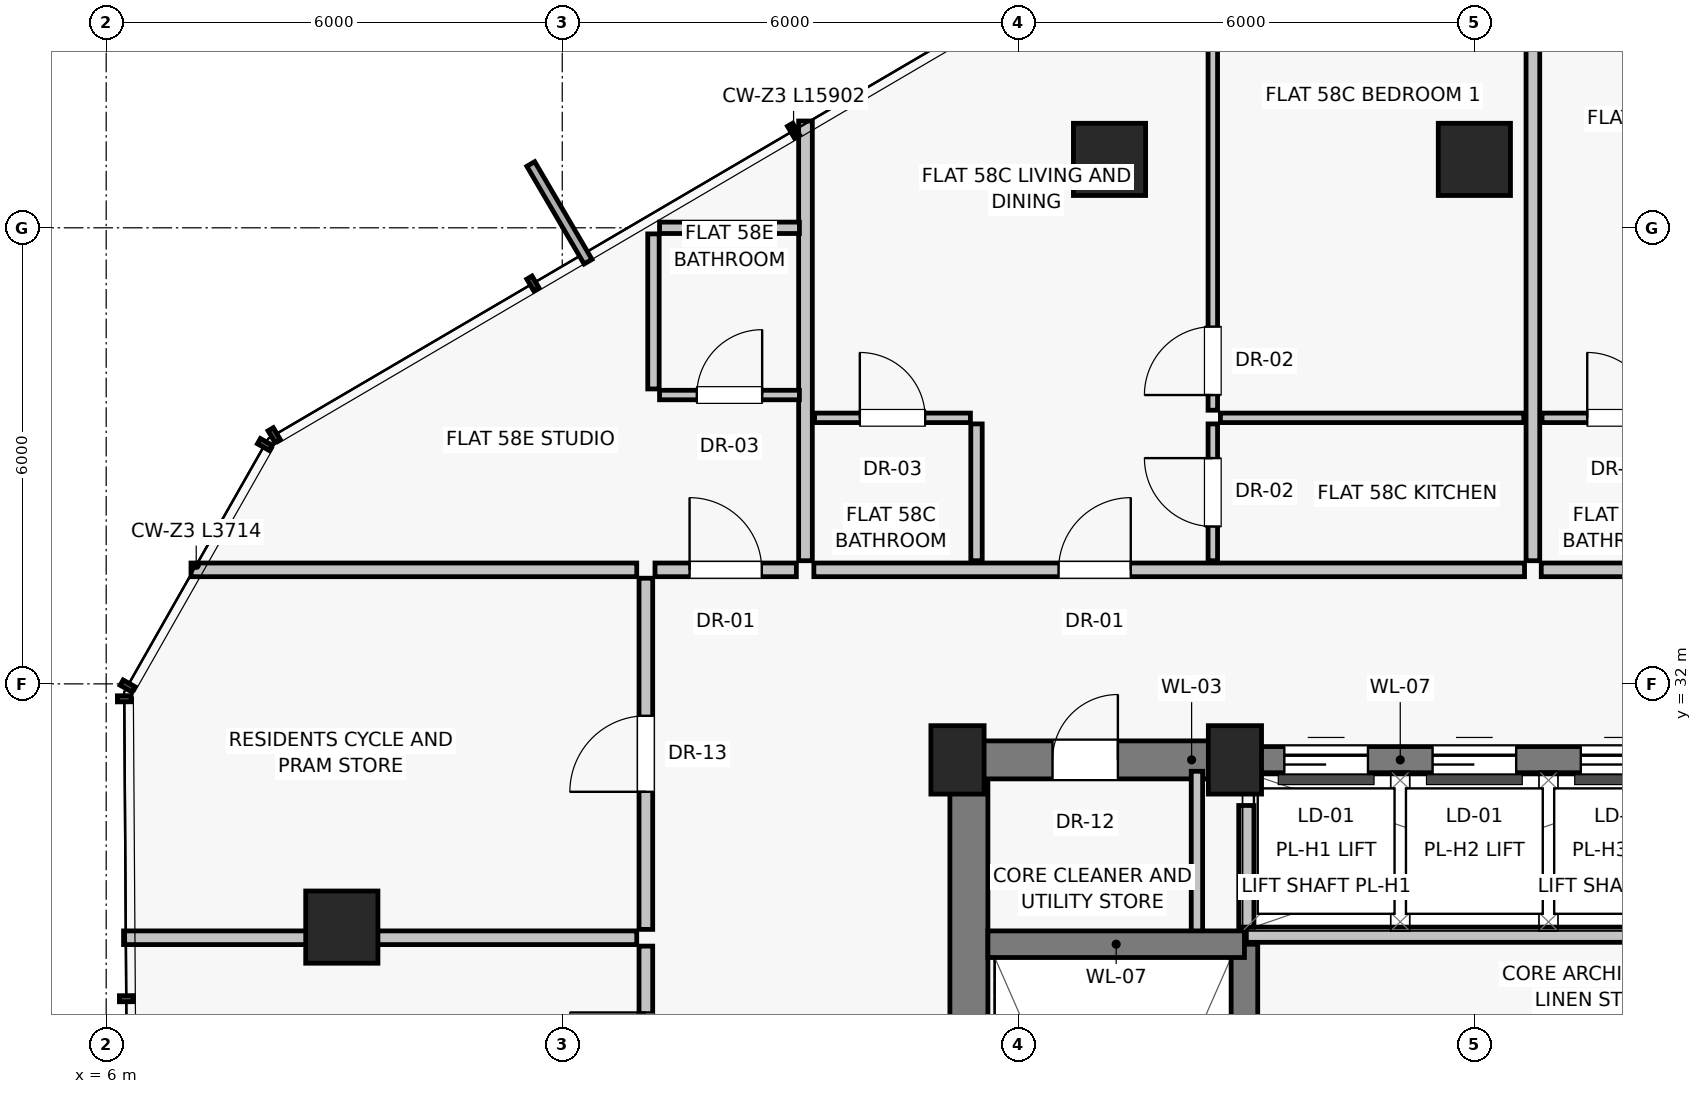
"""IFC4 building model, lengths in metres.
Left out: names, types, materials, properties, quantities, classifications, styles, units other than length and angle.
Written with IfcOpenShell. Run it as: python <this file> out.ifc"""

import sys

from ifc_helpers import new_model, si_unit, direction, frame, frame_2d, origin, origin_2d, place, context, subcontext, project, spatial, rectangle, extrude, source, transform, mapped, element, fill, save


model = new_model("IFC4")
c1 = context("Model", 3, precision=1e-05, world=origin(), true_north=direction((0.0, 1.0)))
c2 = subcontext(c1, "Body", "Model", "MODEL_VIEW")
j1 = project(units=[si_unit("LENGTHUNIT", "METRE"), si_unit("PLANEANGLEUNIT", "RADIAN")], contexts=[c1])
p1 = place(None, origin())
s1 = spatial("IfcSite", under=j1, at=p1, CompositionType="ELEMENT")
p2 = place(p1, origin())
s2 = spatial("IfcBuilding", under=s1, at=p2, CompositionType="ELEMENT")
p3 = place(p2, frame((0.0, 0.0, 204.85)))
s3 = spatial("IfcBuildingStorey", under=s2, at=p3, CompositionType="ELEMENT", Elevation=204.85)
for number, where, z_axis, x_axis in (
    (1, (17.2, 31.0, 0.0), (0.0, 0.0, 1.0), (1.0, 0.0, 0.0)),
    (2, (20.85, 31.0, 0.0), (0.0, 0.0, 1.0), (1.0, 0.0, 0.0)),
):
    element("IfcColumn", number, at=place(p3, frame(where, z_axis=z_axis, x_axis=x_axis)), inside=s3, PredefinedType="PILASTER", context=c2, shape_type="SweptSolid", body=[
        extrude(rectangle(XDim=0.7, YDim=0.9, at=origin_2d()), origin(), (0.0, 0.0, 1.0), 3.25),
    ])
for number, where, z_axis, x_axis in (
    (3, (24.0, 38.9, 0.0), (0.0, 0.0, 1.0), (1.0, 0.0, 0.0)),
    (4, (19.2, 38.9, 0.0), (0.0, 0.0, 1.0), (1.0, 0.0, 0.0)),
    (5, (9.1, 28.8, 0.0), (0.0, 0.0, 1.0), (1.0, 0.0, 0.0)),
):
    element("IfcColumn", number, at=place(p3, frame(where, z_axis=z_axis, x_axis=x_axis)), inside=s3, PredefinedType="COLUMN", context=c2, shape_type="SweptSolid", body=[
        extrude(rectangle(XDim=0.95, YDim=0.95, at=origin_2d()), origin(), (0.0, 0.0, 1.0), 3.25),
    ])
p4 = place(p3, frame((17.35, 16.8, 0.0), z_axis=(0.0, 0.0, 1.0), x_axis=(0.0, 1.0, 0.0)))
e6 = element("IfcWall", 6, at=p4, inside=s3, PredefinedType="SHEAR", context=c2, shape_type="SweptSolid", body=[
    extrude(rectangle(XDim=14.2, YDim=0.5, at=frame_2d((7.1, 0.0))), origin(), (0.0, 0.0, 1.0), 3.015),
])
p5 = place(p3, frame((17.2, 31.0, 0.0), z_axis=(0.0, 0.0, 1.0), x_axis=(1.0, 0.0, 0.0)))
e7 = element("IfcWall", 7, at=p5, inside=s3, PredefinedType="SHEAR", context=c2, shape_type="SweptSolid", body=[
    extrude(rectangle(XDim=3.8, YDim=0.5, at=frame_2d((1.9, 0.0))), origin(), (0.0, 0.0, 1.0), 3.015),
])
p6 = place(p5, frame((1.25, 0.0, 0.0)))
e8 = element("IfcOpeningElement", 8, at=p6, cuts=e7, PredefinedType="OPENING", context=c2, shape_type="SweptSolid", body=[
    extrude(rectangle(XDim=0.86, YDim=2.01, at=frame_2d((0.43, 1.005))), frame((0.0, 0.26, 0.0), z_axis=(0.0, -1.0, 0.0), x_axis=(1.0, 0.0, 0.0)), (0.0, 0.0, 1.0), 0.52),
])
p7 = place(p3, frame((21.0, 31.0, 0.0), z_axis=(0.0, 0.0, 1.0), x_axis=(1.0, 0.0, 0.0)))
e9 = element("IfcWall", 9, at=p7, inside=s3, PredefinedType="SHEAR", context=c2, shape_type="SweptSolid", body=[
    extrude(rectangle(XDim=6.0, YDim=0.35, at=frame_2d((3.0, 0.0))), origin(), (0.0, 0.0, 1.0), 3.015),
])
p8 = place(p7, frame((0.5, 0.0, 0.0)))
e10 = element("IfcOpeningElement", 10, at=p8, cuts=e9, PredefinedType="OPENING", context=c2, shape_type="SweptSolid", body=[
    extrude(rectangle(XDim=1.1, YDim=2.08, at=frame_2d((0.55, 1.04))), frame((0.0, 0.185, 0.0), z_axis=(0.0, -1.0, 0.0), x_axis=(1.0, 0.0, 0.0)), (0.0, 0.0, 1.0), 0.37),
])
p9 = place(p7, frame((2.45, 0.0, 0.0)))
e11 = element("IfcOpeningElement", 11, at=p9, cuts=e9, PredefinedType="OPENING", context=c2, shape_type="SweptSolid", body=[
    extrude(rectangle(XDim=1.1, YDim=2.08, at=frame_2d((0.55, 1.04))), frame((0.0, 0.185, 0.0), z_axis=(0.0, -1.0, 0.0), x_axis=(1.0, 0.0, 0.0)), (0.0, 0.0, 1.0), 0.37),
])
p10 = place(p7, frame((4.4, 0.0, 0.0)))
e12 = element("IfcOpeningElement", 12, at=p10, cuts=e9, PredefinedType="OPENING", context=c2, shape_type="SweptSolid", body=[
    extrude(rectangle(XDim=1.1, YDim=2.08, at=frame_2d((0.55, 1.04))), frame((0.0, 0.185, 0.0), z_axis=(0.0, -1.0, 0.0), x_axis=(1.0, 0.0, 0.0)), (0.0, 0.0, 1.0), 0.37),
])
p11 = place(p3, frame((20.35, 28.65, 0.0), z_axis=(0.0, 0.0, 1.0), x_axis=(0.0, 1.0, 0.0)))
e13 = element("IfcWall", 13, at=p11, inside=s3, PredefinedType="PARTITIONING", context=c2, shape_type="SweptSolid", body=[
    extrude(rectangle(XDim=2.2, YDim=0.15, at=frame_2d((1.1, 0.0))), origin(), (0.0, 0.0, 1.0), 3.015),
])
p12 = place(p3, frame((20.975, 19.8, 0.0), z_axis=(0.0, 0.0, 1.0), x_axis=(0.0, 1.0, 0.0)))
e14 = element("IfcWall", 14, at=p12, inside=s3, PredefinedType="SHEAR", context=c2, shape_type="SweptSolid", body=[
    extrude(rectangle(XDim=8.775, YDim=0.35, at=frame_2d((4.387, 0.0))), origin(), (0.0, 0.0, 1.0), 3.015),
])
p13 = place(p3, frame((17.6, 28.575, 0.0), z_axis=(0.0, 0.0, 1.0), x_axis=(1.0, 0.0, 0.0)))
e15 = element("IfcWall", 15, at=p13, inside=s3, PredefinedType="SHEAR", context=c2, shape_type="SweptSolid", body=[
    extrude(rectangle(XDim=3.375, YDim=0.35, at=frame_2d((1.688, 0.0))), origin(), (0.0, 0.0, 1.0), 3.015),
])
p14 = place(p3, frame((21.0, 28.7, 0.0), z_axis=(0.0, 0.0, 1.0), x_axis=(1.0, 0.0, 0.0)))
e16 = element("IfcWall", 16, at=p14, inside=s3, PredefinedType="SOLIDWALL", context=c2, shape_type="SweptSolid", body=[
    extrude(rectangle(XDim=6.0, YDim=0.2, at=frame_2d((3.0, 0.0))), origin(), (0.0, 0.0, 1.0), 3.015),
])
p15 = place(p3, frame((21.0, 28.8, 0.0), z_axis=(0.0, 0.0, 1.0), x_axis=(0.0, 1.0, 0.0)))
e17 = element("IfcWall", 17, at=p15, inside=s3, PredefinedType="SOLIDWALL", context=c2, shape_type="SweptSolid", body=[
    extrude(rectangle(XDim=1.6, YDim=0.2, at=frame_2d((0.8, 0.0))), origin(), (0.0, 0.0, 1.0), 3.015),
])
p16 = place(p3, frame((15.2, 33.62, 0.0), z_axis=(0.0, 0.0, 1.0), x_axis=(0.0, 1.0, 0.0)))
e18 = element("IfcWall", 18, at=p16, inside=s3, PredefinedType="PARTITIONING", context=c2, shape_type="SweptSolid", body=[
    extrude(rectangle(XDim=5.785, YDim=0.18, at=frame_2d((2.893, 0.0))), origin(), (0.0, 0.0, 1.0), 3.015),
])
p17 = place(p3, frame((15.31, 33.5, 0.0), z_axis=(0.0, 0.0, 1.0), x_axis=(1.0, 0.0, 0.0)))
e19 = element("IfcWall", 19, at=p17, inside=s3, PredefinedType="PARTITIONING", context=c2, shape_type="SweptSolid", body=[
    extrude(rectangle(XDim=9.35, YDim=0.18, at=frame_2d((4.675, 0.0))), origin(), (0.0, 0.0, 1.0), 3.015),
])
p18 = place(p17, frame((3.219, 0.0, 0.0)))
e20 = element("IfcOpeningElement", 20, at=p18, cuts=e19, PredefinedType="OPENING", context=c2, shape_type="SweptSolid", body=[
    extrude(rectangle(XDim=0.95, YDim=2.02, at=frame_2d((0.475, 1.01))), frame((0.0, 0.1, 0.0), z_axis=(0.0, -1.0, 0.0), x_axis=(1.0, 0.0, 0.0)), (0.0, 0.0, 1.0), 0.2),
])
p19 = place(p3, frame((17.45, 33.62, 0.0), z_axis=(0.0, 0.0, 1.0), x_axis=(0.0, 1.0, 0.0)))
e21 = element("IfcWall", 21, at=p19, inside=s3, PredefinedType="PARTITIONING", context=c2, shape_type="SweptSolid", body=[
    extrude(rectangle(XDim=1.8, YDim=0.15, at=frame_2d((0.9, 0.0))), origin(), (0.0, 0.0, 1.0), 3.015),
])
p20 = place(p3, frame((15.32, 35.5, 0.0), z_axis=(0.0, 0.0, 1.0), x_axis=(1.0, 0.0, 0.0)))
e22 = element("IfcWall", 22, at=p20, inside=s3, PredefinedType="PARTITIONING", context=c2, shape_type="SweptSolid", body=[
    extrude(rectangle(XDim=2.05, YDim=0.125, at=frame_2d((1.025, 0.0))), origin(), (0.0, 0.0, 1.0), 3.015),
])
p21 = place(p20, frame((0.595, 0.0, 0.0)))
e23 = element("IfcOpeningElement", 23, at=p21, cuts=e22, PredefinedType="OPENING", context=c2, shape_type="SweptSolid", body=[
    extrude(rectangle(XDim=0.86, YDim=2.01, at=frame_2d((0.43, 1.005))), frame((0.0, 0.073, 0.0), z_axis=(0.0, -1.0, 0.0), x_axis=(1.0, 0.0, 0.0)), (0.0, 0.0, 1.0), 0.145),
])
p22 = place(p3, frame((20.559, 33.62, 0.0), z_axis=(0.0, 0.0, 1.0), x_axis=(0.0, 1.0, 0.0)))
e24 = element("IfcWall", 24, at=p22, inside=s3, PredefinedType="PARTITIONING", context=c2, shape_type="SweptSolid", body=[
    extrude(rectangle(XDim=1.8, YDim=0.125, at=frame_2d((0.9, 0.0))), origin(), (0.0, 0.0, 1.0), 2.469),
])
p23 = place(p22, frame((0.45, 0.0, 0.0)))
e25 = element("IfcOpeningElement", 25, at=p23, cuts=e24, PredefinedType="OPENING", context=c2, shape_type="SweptSolid", body=[
    extrude(rectangle(XDim=0.9, YDim=2.01, at=frame_2d((0.45, 1.005))), frame((0.0, 0.073, 0.0), z_axis=(0.0, -1.0, 0.0), x_axis=(1.0, 0.0, 0.0)), (0.0, 0.0, 1.0), 0.145),
])
p24 = place(p3, frame((20.659, 35.5, 0.0), z_axis=(0.0, 0.0, 1.0), x_axis=(1.0, 0.0, 0.0)))
e26 = element("IfcWall", 26, at=p24, inside=s3, PredefinedType="PARTITIONING", context=c2, shape_type="SweptSolid", body=[
    extrude(rectangle(XDim=3.991, YDim=0.125, at=frame_2d((1.996, 0.0))), origin(), (0.0, 0.0, 1.0), 2.662),
])
p25 = place(p3, frame((20.559, 35.6, 0.0), z_axis=(0.0, 0.0, 1.0), x_axis=(0.0, 1.0, 0.0)))
e27 = element("IfcWall", 27, at=p25, inside=s3, PredefinedType="PARTITIONING", context=c2, shape_type="SweptSolid", body=[
    extrude(rectangle(XDim=6.947, YDim=0.125, at=frame_2d((3.473, 0.0))), origin(), (0.0, 0.0, 1.0), 3.015),
])
p26 = place(p25, frame((0.2, 0.0, 0.0)))
e28 = element("IfcOpeningElement", 28, at=p26, cuts=e27, PredefinedType="OPENING", context=c2, shape_type="SweptSolid", body=[
    extrude(rectangle(XDim=0.9, YDim=2.01, at=frame_2d((0.45, 1.005))), frame((0.0, 0.073, 0.0), z_axis=(0.0, -1.0, 0.0), x_axis=(1.0, 0.0, 0.0)), (0.0, 0.0, 1.0), 0.145),
])
p27 = place(p3, frame((24.77, 33.62, 0.0), z_axis=(0.0, 0.0, 1.0), x_axis=(0.0, 1.0, 0.0)))
e29 = element("IfcWall", 29, at=p27, inside=s3, PredefinedType="PARTITIONING", context=c2, shape_type="SweptSolid", body=[
    extrude(rectangle(XDim=9.759, YDim=0.18, at=frame_2d((4.879, 0.0))), origin(), (0.0, 0.0, 1.0), 3.015),
])
p28 = place(p3, frame((24.88, 33.5, 0.0), z_axis=(0.0, 0.0, 1.0), x_axis=(1.0, 0.0, 0.0)))
e30 = element("IfcWall", 30, at=p28, inside=s3, PredefinedType="PARTITIONING", context=c2, shape_type="SweptSolid", body=[
    extrude(rectangle(XDim=6.21, YDim=0.18, at=frame_2d((3.105, 0.0))), origin(), (0.0, 0.0, 1.0), 3.015),
])
p29 = place(p28, frame((2.64, 0.0, 0.0)))
e31 = element("IfcOpeningElement", 31, at=p29, cuts=e30, PredefinedType="OPENING", context=c2, shape_type="SweptSolid", body=[
    extrude(rectangle(XDim=0.95, YDim=2.02, at=frame_2d((0.475, 1.01))), frame((0.0, 0.1, 0.0), z_axis=(0.0, -1.0, 0.0), x_axis=(1.0, 0.0, 0.0)), (0.0, 0.0, 1.0), 0.2),
])
p30 = place(p3, frame((24.89, 35.5, 0.0), z_axis=(0.0, 0.0, 1.0), x_axis=(1.0, 0.0, 0.0)))
e32 = element("IfcWall", 32, at=p30, inside=s3, PredefinedType="PARTITIONING", context=c2, shape_type="SweptSolid", body=[
    extrude(rectangle(XDim=2.05, YDim=0.125, at=frame_2d((1.025, 0.0))), origin(), (0.0, 0.0, 1.0), 2.662),
])
p31 = place(p30, frame((0.595, 0.0, 0.0)))
e33 = element("IfcOpeningElement", 33, at=p31, cuts=e32, PredefinedType="OPENING", context=c2, shape_type="SweptSolid", body=[
    extrude(rectangle(XDim=0.86, YDim=2.01, at=frame_2d((0.43, 1.005))), frame((0.0, 0.073, 0.0), z_axis=(0.0, -1.0, 0.0), x_axis=(1.0, 0.0, 0.0)), (0.0, 0.0, 1.0), 0.145),
])
p32 = place(p3, frame((12.98, 33.5, 0.0), z_axis=(0.0, 0.0, 1.0), x_axis=(-1.0, 0.0, 0.0)))
e34 = element("IfcWall", 34, at=p32, inside=s3, PredefinedType="PARTITIONING", context=c2, shape_type="SweptSolid", body=[
    extrude(rectangle(XDim=5.864, YDim=0.18, at=frame_2d((2.932, 0.0))), origin(), (0.0, 0.0, 1.0), 3.015),
])
p33 = place(p3, frame((13.1, 25.804, 0.0), z_axis=(0.0, 0.0, 1.0), x_axis=(0.0, 1.0, 0.0)))
e35 = element("IfcWall", 35, at=p33, inside=s3, PredefinedType="PARTITIONING", context=c2, shape_type="SweptSolid", body=[
    extrude(rectangle(XDim=2.746, YDim=0.18, at=frame_2d((1.373, 0.0))), origin(), (0.0, 0.0, 1.0), 2.662),
])
p34 = place(p33, frame((0.873, 0.0, 0.0)))
e36 = element("IfcOpeningElement", 36, at=p34, cuts=e35, PredefinedType="OPENING", context=c2, shape_type="SweptSolid", body=[
    extrude(rectangle(XDim=1.0, YDim=2.01, at=frame_2d((0.5, 1.005))), frame((0.0, 0.1, 0.0), z_axis=(0.0, -1.0, 0.0), x_axis=(1.0, 0.0, 0.0)), (0.0, 0.0, 1.0), 0.2),
])
p35 = place(p3, frame((13.1, 28.77, 0.0), z_axis=(0.0, 0.0, 1.0), x_axis=(0.0, 1.0, 0.0)))
e37 = element("IfcWall", 37, at=p35, inside=s3, PredefinedType="PARTITIONING", context=c2, shape_type="SweptSolid", body=[
    extrude(rectangle(XDim=4.62, YDim=0.18, at=frame_2d((2.31, 0.0))), origin(), (0.0, 0.0, 1.0), 2.662),
])
p36 = place(p35, frame((1.81, 0.0, 0.0)))
e38 = element("IfcOpeningElement", 38, at=p36, cuts=e37, PredefinedType="OPENING", context=c2, shape_type="SweptSolid", body=[
    extrude(rectangle(XDim=1.0, YDim=2.01, at=frame_2d((0.5, 1.005))), frame((0.0, 0.1, 0.0), z_axis=(0.0, -1.0, 0.0), x_axis=(1.0, 0.0, 0.0)), (0.0, 0.0, 1.0), 0.2),
])
p37 = place(p3, frame((12.98, 28.66, 0.0), z_axis=(0.0, 0.0, 1.0), x_axis=(-1.0, 0.0, 0.0)))
e39 = element("IfcWall", 39, at=p37, inside=s3, PredefinedType="PARTITIONING", context=c2, shape_type="SweptSolid", body=[
    extrude(rectangle(XDim=6.751, YDim=0.18, at=frame_2d((3.376, 0.0))), origin(), (0.0, 0.0, 1.0), 2.469),
])
p38 = place(p3, frame((13.22, 33.5, 0.0), z_axis=(0.0, 0.0, 1.0), x_axis=(1.0, 0.0, 0.0)))
e40 = element("IfcWall", 40, at=p38, inside=s3, PredefinedType="PARTITIONING", context=c2, shape_type="SweptSolid", body=[
    extrude(rectangle(XDim=1.86, YDim=0.18, at=frame_2d((0.93, 0.0))), origin(), (0.0, 0.0, 1.0), 3.015),
])
p39 = place(p38, frame((0.455, 0.0, 0.0)))
e41 = element("IfcOpeningElement", 41, at=p39, cuts=e40, PredefinedType="OPENING", context=c2, shape_type="SweptSolid", body=[
    extrude(rectangle(XDim=0.95, YDim=2.02, at=frame_2d((0.475, 1.01))), frame((0.0, 0.1, 0.0), z_axis=(0.0, -1.0, 0.0), x_axis=(1.0, 0.0, 0.0)), (0.0, 0.0, 1.0), 0.2),
])
p40 = place(p3, frame((13.28, 35.8, 0.0), z_axis=(0.0, 0.0, 1.0), x_axis=(1.0, 0.0, 0.0)))
e42 = element("IfcWall", 42, at=p40, inside=s3, PredefinedType="PARTITIONING", context=c2, shape_type="SweptSolid", body=[
    extrude(rectangle(XDim=1.84, YDim=0.125, at=frame_2d((0.92, 0.0))), origin(), (0.0, 0.0, 1.0), 3.015),
])
p41 = place(p40, frame((0.49, 0.0, 0.0)))
e43 = element("IfcOpeningElement", 43, at=p41, cuts=e42, PredefinedType="OPENING", context=c2, shape_type="SweptSolid", body=[
    extrude(rectangle(XDim=0.86, YDim=2.01, at=frame_2d((0.43, 1.005))), frame((0.0, 0.073, 0.0), z_axis=(0.0, -1.0, 0.0), x_axis=(1.0, 0.0, 0.0)), (0.0, 0.0, 1.0), 0.145),
])
p42 = place(p3, frame((13.28, 38.0, 0.0), z_axis=(0.0, 0.0, 1.0), x_axis=(1.0, 0.0, 0.0)))
e44 = element("IfcWall", 44, at=p42, inside=s3, PredefinedType="PARTITIONING", context=c2, shape_type="SweptSolid", body=[
    extrude(rectangle(XDim=1.84, YDim=0.15, at=frame_2d((0.92, 0.0))), origin(), (0.0, 0.0, 1.0), 3.015),
])
p43 = place(p3, frame((13.2, 35.88, 0.0), z_axis=(0.0, 0.0, 1.0), x_axis=(0.0, 1.0, 0.0)))
e45 = element("IfcWall", 45, at=p43, inside=s3, PredefinedType="PARTITIONING", context=c2, shape_type="SweptSolid", body=[
    extrude(rectangle(XDim=2.04, YDim=0.15, at=frame_2d((1.02, 0.0))), origin(), (0.0, 0.0, 1.0), 3.015),
])
m1 = source(origin(), c2, "Body", "SweptSolid", [
    extrude(rectangle(XDim=0.86, YDim=2.01, at=frame_2d((0.43, 1.005))), frame((0.0, 0.025, 0.0), z_axis=(0.0, -1.0, 0.0), x_axis=(1.0, 0.0, 0.0)), (0.0, 0.0, 1.0), 0.05),
])
p44 = place(p6, origin())
e46 = element("IfcDoor", 46, at=p44, inside=s3, OperationType="SINGLE_SWING_RIGHT", PredefinedType="DOOR", context=c2, shape_type="MappedRepresentation", body=[
    mapped(m1, transform((0.0, 0.0, 0.0), scale=1.0)),
])
fill(e8, e46)
m2 = source(origin(), c2, "Body", "SweptSolid", [
    extrude(rectangle(XDim=1.1, YDim=2.08, at=frame_2d((0.55, 1.04))), frame((0.0, 0.025, 0.0), z_axis=(0.0, -1.0, 0.0), x_axis=(1.0, 0.0, 0.0)), (0.0, 0.0, 1.0), 0.05),
])
p45 = place(p8, origin())
e47 = element("IfcDoor", 47, at=p45, inside=s3, OperationType="SLIDING_TO_LEFT", PredefinedType="DOOR", context=c2, shape_type="MappedRepresentation", body=[
    mapped(m2, transform((0.0, 0.0, 0.0), scale=1.0)),
])
fill(e10, e47)
p46 = place(p9, origin())
e48 = element("IfcDoor", 48, at=p46, inside=s3, OperationType="SLIDING_TO_LEFT", PredefinedType="DOOR", context=c2, shape_type="MappedRepresentation", body=[
    mapped(m2, transform((0.0, 0.0, 0.0), scale=1.0)),
])
fill(e11, e48)
p47 = place(p10, origin())
e49 = element("IfcDoor", 49, at=p47, inside=s3, OperationType="SLIDING_TO_LEFT", PredefinedType="DOOR", context=c2, shape_type="MappedRepresentation", body=[
    mapped(m2, transform((0.0, 0.0, 0.0), scale=1.0)),
])
fill(e12, e49)
m3 = source(origin(), c2, "Body", "SweptSolid", [
    extrude(rectangle(XDim=0.95, YDim=2.02, at=frame_2d((0.475, 1.01))), frame((0.0, 0.025, 0.0), z_axis=(0.0, -1.0, 0.0), x_axis=(1.0, 0.0, 0.0)), (0.0, 0.0, 1.0), 0.05),
])
p48 = place(p18, origin())
e50 = element("IfcDoor", 50, at=p48, inside=s3, OperationType="SINGLE_SWING_RIGHT", PredefinedType="DOOR", context=c2, shape_type="MappedRepresentation", body=[
    mapped(m3, transform((0.0, 0.0, 0.0), scale=1.0)),
])
fill(e20, e50)
p49 = place(p21, origin())
e51 = element("IfcDoor", 51, at=p49, inside=s3, OperationType="SINGLE_SWING_LEFT", PredefinedType="DOOR", context=c2, shape_type="MappedRepresentation", body=[
    mapped(m1, transform((0.0, 0.0, 0.0), scale=1.0)),
])
fill(e23, e51)
m4 = source(origin(), c2, "Body", "SweptSolid", [
    extrude(rectangle(XDim=0.9, YDim=2.01, at=frame_2d((0.45, 1.005))), frame((0.0, 0.025, 0.0), z_axis=(0.0, -1.0, 0.0), x_axis=(1.0, 0.0, 0.0)), (0.0, 0.0, 1.0), 0.05),
])
p50 = place(p23, origin())
e52 = element("IfcDoor", 52, at=p50, inside=s3, OperationType="SINGLE_SWING_RIGHT", PredefinedType="DOOR", context=c2, shape_type="MappedRepresentation", body=[
    mapped(m4, transform((0.0, 0.0, 0.0), scale=1.0)),
])
fill(e25, e52)
p51 = place(p26, origin())
e53 = element("IfcDoor", 53, at=p51, inside=s3, OperationType="SINGLE_SWING_LEFT", PredefinedType="DOOR", context=c2, shape_type="MappedRepresentation", body=[
    mapped(m4, transform((0.0, 0.0, 0.0), scale=1.0)),
])
fill(e28, e53)
p52 = place(p31, origin())
e54 = element("IfcDoor", 54, at=p52, inside=s3, OperationType="SINGLE_SWING_LEFT", PredefinedType="DOOR", context=c2, shape_type="MappedRepresentation", body=[
    mapped(m1, transform((0.0, 0.0, 0.0), scale=1.0)),
])
fill(e33, e54)
m5 = source(origin(), c2, "Body", "SweptSolid", [
    extrude(rectangle(XDim=1.0, YDim=2.01, at=frame_2d((0.5, 1.005))), frame((0.0, 0.025, 0.0), z_axis=(0.0, -1.0, 0.0), x_axis=(1.0, 0.0, 0.0)), (0.0, 0.0, 1.0), 0.05),
])
p53 = place(p34, origin())
e55 = element("IfcDoor", 55, at=p53, inside=s3, OperationType="SINGLE_SWING_RIGHT", PredefinedType="DOOR", context=c2, shape_type="MappedRepresentation", body=[
    mapped(m5, transform((0.0, 0.0, 0.0), scale=1.0)),
])
fill(e36, e55)
p54 = place(p36, origin())
e56 = element("IfcDoor", 56, at=p54, inside=s3, OperationType="SINGLE_SWING_LEFT", PredefinedType="DOOR", context=c2, shape_type="MappedRepresentation", body=[
    mapped(m5, transform((0.0, 0.0, 0.0), scale=1.0)),
])
fill(e38, e56)
p55 = place(p39, origin())
e57 = element("IfcDoor", 57, at=p55, inside=s3, OperationType="SINGLE_SWING_LEFT", PredefinedType="DOOR", context=c2, shape_type="MappedRepresentation", body=[
    mapped(m3, transform((0.0, 0.0, 0.0), scale=1.0)),
])
fill(e41, e57)
p56 = place(p41, origin())
e58 = element("IfcDoor", 58, at=p56, inside=s3, OperationType="SINGLE_SWING_RIGHT", PredefinedType="DOOR", context=c2, shape_type="MappedRepresentation", body=[
    mapped(m1, transform((0.0, 0.0, 0.0), scale=1.0)),
])
fill(e43, e58)
save(model, sys.argv[1])
